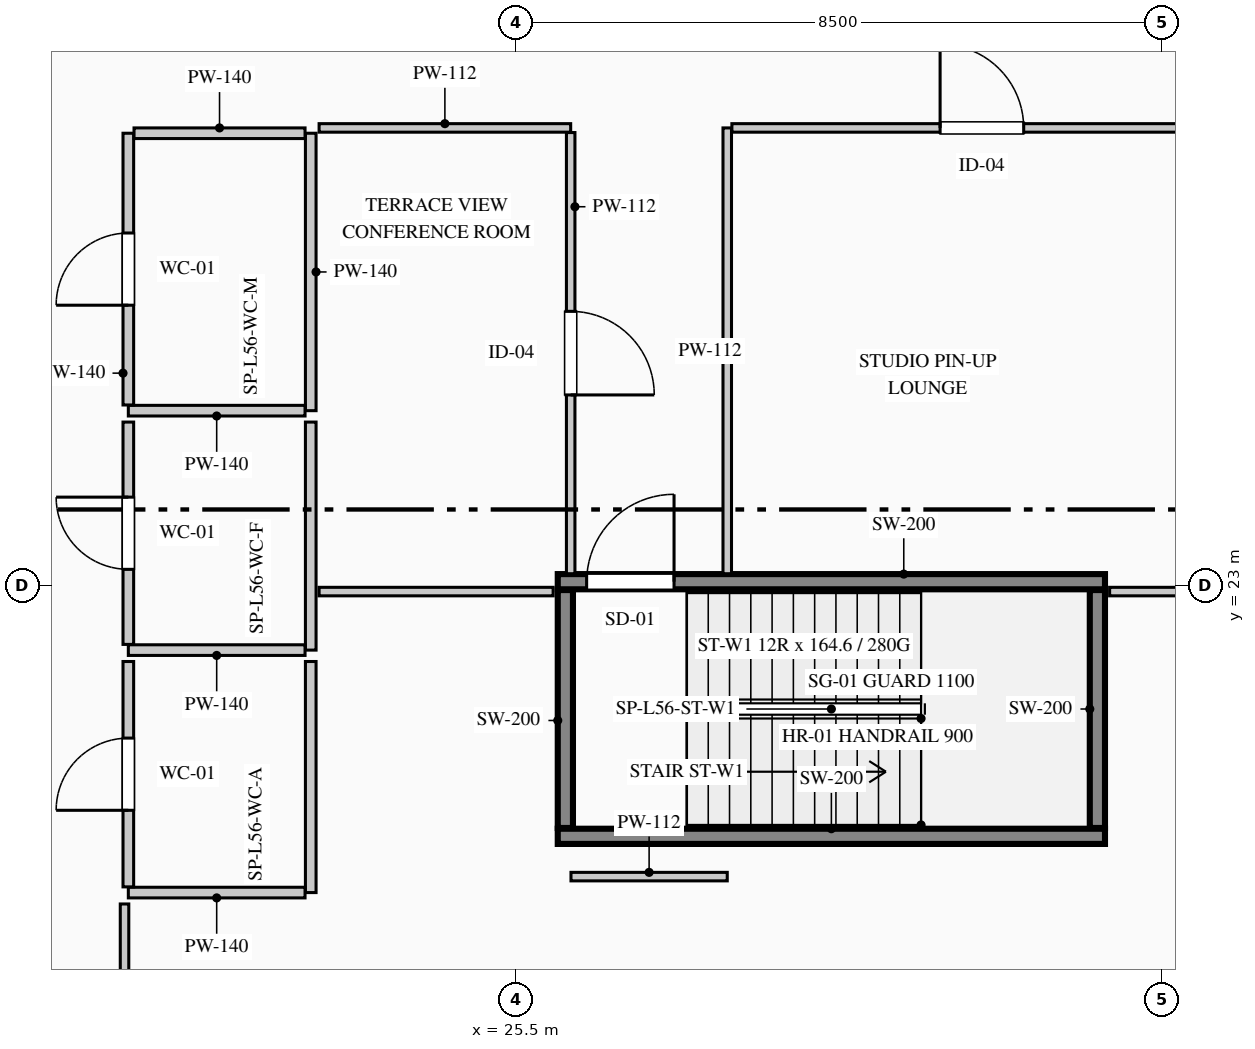
"""IFC4 building model, lengths in metres.
Left out: names, types, materials, properties, quantities, classifications, styles, units other than length and angle.
Written with IfcOpenShell. Run it as: python <this file> out.ifc"""

import sys

from ifc_helpers import new_model, si_unit, direction, frame, frame_2d, origin, place, context, subcontext, project, spatial, rectangle, extrude, element, fill, save


model = new_model("IFC4")
c1 = context("Model", 3, precision=1e-05, world=origin(), true_north=direction((0.0, 1.0)))
c2 = subcontext(c1, "Body", "Model", "MODEL_VIEW")
j1 = project(units=[si_unit("LENGTHUNIT", "METRE"), si_unit("PLANEANGLEUNIT", "RADIAN")], contexts=[c1])
p1 = place(None, origin())
s1 = spatial("IfcSite", under=j1, at=p1, CompositionType="ELEMENT")
p2 = place(p1, origin())
s2 = spatial("IfcBuilding", under=s1, at=p2, CompositionType="ELEMENT")
p3 = place(p2, frame((0.0, 0.0, 235.1)))
s3 = spatial("IfcBuildingStorey", under=s2, at=p3, CompositionType="ELEMENT", Elevation=235.1)
p4 = place(p3, frame((26.05, 19.7, 0.0), z_axis=(0.0, 0.0, 1.0), x_axis=(1.0, 0.0, 0.0)))
e1 = element("IfcWall", 1, at=p4, inside=s3, PredefinedType="SHEAR", context=c2, shape_type="SweptSolid", body=[
    extrude(rectangle(XDim=7.2, YDim=0.2, at=frame_2d((3.6, 0.0))), origin(), (0.0, 0.0, 1.0), 3.95),
])
p5 = place(p3, frame((26.05, 23.05, 0.0), z_axis=(0.0, 0.0, 1.0), x_axis=(1.0, 0.0, 0.0)))
e2 = element("IfcWall", 2, at=p5, inside=s3, PredefinedType="SHEAR", context=c2, shape_type="SweptSolid", body=[
    extrude(rectangle(XDim=7.2, YDim=0.2, at=frame_2d((3.6, 0.0))), origin(), (0.0, 0.0, 1.0), 3.95),
])
p6 = place(p5, frame((0.38, 0.0, 0.0)))
e3 = element("IfcOpeningElement", 3, at=p6, cuts=e2, PredefinedType="OPENING", context=c2, shape_type="SweptSolid", body=[
    extrude(rectangle(XDim=1.15, YDim=2.2, at=frame_2d((0.575, 1.1))), frame((0.0, 0.11, 0.0), z_axis=(0.0, -1.0, 0.0), x_axis=(1.0, 0.0, 0.0)), (0.0, 0.0, 1.0), 0.22),
])
for number, where, z_axis, x_axis in (
    (4, (26.15, 19.81, 0.0), (0.0, 0.0, 1.0), (0.0, 1.0, 0.0)),
    (5, (33.15, 19.81, 0.0), (0.0, 0.0, 1.0), (0.0, 1.0, 0.0)),
):
    element("IfcWall", number, at=place(p3, frame(where, z_axis=z_axis, x_axis=x_axis)), inside=s3, PredefinedType="SHEAR", context=c2, shape_type="SweptSolid", body=[
        extrude(rectangle(XDim=3.13, YDim=0.2, at=frame_2d((1.565, 0.0))), origin(), (0.0, 0.0, 1.0), 3.95),
    ])
p7 = place(p3, frame((22.8, 28.95, 0.0), z_axis=(0.0, 0.0, 1.0), x_axis=(0.0, -1.0, 0.0)))
e6 = element("IfcWall", 6, at=p7, inside=s3, PredefinedType="PARTITIONING", context=c2, shape_type="SweptSolid", body=[
    extrude(rectangle(XDim=3.65, YDim=0.14, at=frame_2d((1.825, 0.0))), origin(), (0.0, 0.0, 1.0), 3.325),
])
p8 = place(p3, frame((22.725, 25.3, 0.0), z_axis=(0.0, 0.0, 1.0), x_axis=(-1.0, 0.0, 0.0)))
e7 = element("IfcWall", 7, at=p8, inside=s3, PredefinedType="PARTITIONING", context=c2, shape_type="SweptSolid", body=[
    extrude(rectangle(XDim=2.325, YDim=0.14, at=frame_2d((1.163, 0.0))), origin(), (0.0, 0.0, 1.0), 3.7),
])
p9 = place(p3, frame((20.4, 25.375, 0.0), z_axis=(0.0, 0.0, 1.0), x_axis=(0.0, 1.0, 0.0)))
e8 = element("IfcWall", 8, at=p9, inside=s3, PredefinedType="PARTITIONING", context=c2, shape_type="SweptSolid", body=[
    extrude(rectangle(XDim=3.575, YDim=0.14, at=frame_2d((1.788, 0.0))), origin(), (0.0, 0.0, 1.0), 3.7),
])
p10 = place(p9, frame((1.312, 0.0, 0.0)))
e9 = element("IfcOpeningElement", 9, at=p10, cuts=e8, PredefinedType="OPENING", context=c2, shape_type="SweptSolid", body=[
    extrude(rectangle(XDim=0.95, YDim=2.15, at=frame_2d((0.475, 1.075))), frame((0.0, 0.08, 0.0), z_axis=(0.0, -1.0, 0.0), x_axis=(1.0, 0.0, 0.0)), (0.0, 0.0, 1.0), 0.16),
])
p11 = place(p3, frame((20.475, 28.95, 0.0), z_axis=(0.0, 0.0, 1.0), x_axis=(1.0, 0.0, 0.0)))
e10 = element("IfcWall", 10, at=p11, inside=s3, PredefinedType="PARTITIONING", context=c2, shape_type="SweptSolid", body=[
    extrude(rectangle(XDim=2.25, YDim=0.14, at=frame_2d((1.125, 0.0))), origin(), (0.0, 0.0, 1.0), 3.7),
])
p12 = place(p3, frame((22.8, 25.15, 0.0), z_axis=(0.0, 0.0, 1.0), x_axis=(0.0, -1.0, 0.0)))
e11 = element("IfcWall", 11, at=p12, inside=s3, PredefinedType="PARTITIONING", context=c2, shape_type="SweptSolid", body=[
    extrude(rectangle(XDim=3.0, YDim=0.14, at=frame_2d((1.5, 0.0))), origin(), (0.0, 0.0, 1.0), 3.325),
])
p13 = place(p3, frame((22.725, 22.15, 0.0), z_axis=(0.0, 0.0, 1.0), x_axis=(-1.0, 0.0, 0.0)))
e12 = element("IfcWall", 12, at=p13, inside=s3, PredefinedType="PARTITIONING", context=c2, shape_type="SweptSolid", body=[
    extrude(rectangle(XDim=2.325, YDim=0.14, at=frame_2d((1.163, 0.0))), origin(), (0.0, 0.0, 1.0), 3.7),
])
p14 = place(p3, frame((20.4, 22.225, 0.0), z_axis=(0.0, 0.0, 1.0), x_axis=(0.0, 1.0, 0.0)))
e13 = element("IfcWall", 13, at=p14, inside=s3, PredefinedType="PARTITIONING", context=c2, shape_type="SweptSolid", body=[
    extrude(rectangle(XDim=2.925, YDim=0.14, at=frame_2d((1.462, 0.0))), origin(), (0.0, 0.0, 1.0), 3.7),
])
p15 = place(p14, frame((0.988, 0.0, 0.0)))
e14 = element("IfcOpeningElement", 14, at=p15, cuts=e13, PredefinedType="OPENING", context=c2, shape_type="SweptSolid", body=[
    extrude(rectangle(XDim=0.95, YDim=2.15, at=frame_2d((0.475, 1.075))), frame((0.0, 0.08, 0.0), z_axis=(0.0, -1.0, 0.0), x_axis=(1.0, 0.0, 0.0)), (0.0, 0.0, 1.0), 0.16),
])
p16 = place(p3, frame((22.8, 22.0, 0.0), z_axis=(0.0, 0.0, 1.0), x_axis=(0.0, -1.0, 0.0)))
e15 = element("IfcWall", 15, at=p16, inside=s3, PredefinedType="PARTITIONING", context=c2, shape_type="SweptSolid", body=[
    extrude(rectangle(XDim=3.04, YDim=0.14, at=frame_2d((1.52, 0.0))), origin(), (0.0, 0.0, 1.0), 3.325),
])
p17 = place(p3, frame((22.725, 18.96, 0.0), z_axis=(0.0, 0.0, 1.0), x_axis=(-1.0, 0.0, 0.0)))
e16 = element("IfcWall", 16, at=p17, inside=s3, PredefinedType="PARTITIONING", context=c2, shape_type="SweptSolid", body=[
    extrude(rectangle(XDim=2.325, YDim=0.14, at=frame_2d((1.163, 0.0))), origin(), (0.0, 0.0, 1.0), 3.7),
])
p18 = place(p3, frame((20.4, 19.035, 0.0), z_axis=(0.0, 0.0, 1.0), x_axis=(0.0, 1.0, 0.0)))
e17 = element("IfcWall", 17, at=p18, inside=s3, PredefinedType="PARTITIONING", context=c2, shape_type="SweptSolid", body=[
    extrude(rectangle(XDim=2.965, YDim=0.14, at=frame_2d((1.482, 0.0))), origin(), (0.0, 0.0, 1.0), 3.7),
])
p19 = place(p18, frame((1.008, 0.0, 0.0)))
e18 = element("IfcOpeningElement", 18, at=p19, cuts=e17, PredefinedType="OPENING", context=c2, shape_type="SweptSolid", body=[
    extrude(rectangle(XDim=0.95, YDim=2.15, at=frame_2d((0.475, 1.075))), frame((0.0, 0.08, 0.0), z_axis=(0.0, -1.0, 0.0), x_axis=(1.0, 0.0, 0.0)), (0.0, 0.0, 1.0), 0.16),
])
p20 = place(p3, frame((33.311, 22.92, 0.0), z_axis=(0.0, 0.0, 1.0), x_axis=(1.0, 0.0, 0.0)))
e19 = element("IfcWall", 19, at=p20, inside=s3, PredefinedType="PARTITIONING", context=c2, shape_type="SweptSolid", body=[
    extrude(rectangle(XDim=5.817, YDim=0.112, at=frame_2d((2.909, 0.0))), origin(), (0.0, 0.0, 1.0), 3.7),
])
p21 = place(p3, frame((20.35, 12.689, 0.0), z_axis=(0.0, 0.0, 1.0), x_axis=(0.0, 1.0, 0.0)))
e20 = element("IfcWall", 20, at=p21, inside=s3, PredefinedType="PARTITIONING", context=c2, shape_type="SweptSolid", body=[
    extrude(rectangle(XDim=6.121, YDim=0.112, at=frame_2d((3.061, 0.0))), origin(), (0.0, 0.0, 1.0), 3.7),
])
p22 = place(p21, frame((2.511, 0.0, 0.0)))
e21 = element("IfcOpeningElement", 21, at=p22, cuts=e20, PredefinedType="OPENING", context=c2, shape_type="SweptSolid", body=[
    extrude(rectangle(XDim=1.1, YDim=2.2, at=frame_2d((0.55, 1.1))), frame((0.0, 0.066, 0.0), z_axis=(0.0, -1.0, 0.0), x_axis=(1.0, 0.0, 0.0)), (0.0, 0.0, 1.0), 0.132),
])
p23 = place(p3, frame((22.91, 22.92, 0.0), z_axis=(0.0, 0.0, 1.0), x_axis=(1.0, 0.0, 0.0)))
e22 = element("IfcWall", 22, at=p23, inside=s3, PredefinedType="PARTITIONING", context=c2, shape_type="SweptSolid", body=[
    extrude(rectangle(XDim=3.079, YDim=0.112, at=frame_2d((1.54, 0.0))), origin(), (0.0, 0.0, 1.0), 3.7),
])
p24 = place(p3, frame((26.224, 19.17, 0.0), z_axis=(0.0, 0.0, 1.0), x_axis=(1.0, 0.0, 0.0)))
e23 = element("IfcWall", 23, at=p24, inside=s3, PredefinedType="PARTITIONING", context=c2, shape_type="SweptSolid", body=[
    extrude(rectangle(XDim=2.056, YDim=0.112, at=frame_2d((1.028, 0.0))), origin(), (0.0, 0.0, 1.0), 3.7),
])
p25 = place(p3, frame((22.91, 29.02, 0.0), z_axis=(0.0, 0.0, 1.0), x_axis=(1.0, 0.0, 0.0)))
e24 = element("IfcWall", 24, at=p25, inside=s3, PredefinedType="PARTITIONING", context=c2, shape_type="SweptSolid", body=[
    extrude(rectangle(XDim=3.31, YDim=0.112, at=frame_2d((1.655, 0.0))), origin(), (0.0, 0.0, 1.0), 3.485),
])
p26 = place(p3, frame((26.22, 28.959, 0.0), z_axis=(0.0, 0.0, 1.0), x_axis=(0.0, -1.0, 0.0)))
e25 = element("IfcWall", 25, at=p26, inside=s3, PredefinedType="PARTITIONING", context=c2, shape_type="SweptSolid", body=[
    extrude(rectangle(XDim=5.804, YDim=0.112, at=frame_2d((2.902, 0.0))), origin(), (0.0, 0.0, 1.0), 3.7),
])
p27 = place(p26, frame((2.352, 0.0, 0.0)))
e26 = element("IfcOpeningElement", 26, at=p27, cuts=e25, PredefinedType="OPENING", context=c2, shape_type="SweptSolid", body=[
    extrude(rectangle(XDim=1.1, YDim=2.2, at=frame_2d((0.55, 1.1))), frame((0.0, 0.066, 0.0), z_axis=(0.0, -1.0, 0.0), x_axis=(1.0, 0.0, 0.0)), (0.0, 0.0, 1.0), 0.132),
])
p28 = place(p3, frame((28.28, 23.155, 0.0), z_axis=(0.0, 0.0, 1.0), x_axis=(0.0, 1.0, 0.0)))
e27 = element("IfcWall", 27, at=p28, inside=s3, PredefinedType="PARTITIONING", context=c2, shape_type="SweptSolid", body=[
    extrude(rectangle(XDim=5.865, YDim=0.112, at=frame_2d((2.933, 0.0))), origin(), (0.0, 0.0, 1.0), 3.7),
])
p29 = place(p3, frame((28.341, 29.02, 0.0), z_axis=(0.0, 0.0, 1.0), x_axis=(1.0, 0.0, 0.0)))
e28 = element("IfcWall", 28, at=p29, inside=s3, PredefinedType="PARTITIONING", context=c2, shape_type="SweptSolid", body=[
    extrude(rectangle(XDim=6.579, YDim=0.112, at=frame_2d((3.29, 0.0))), origin(), (0.0, 0.0, 1.0), 3.485),
])
p30 = place(p29, frame((2.74, 0.0, 0.0)))
e29 = element("IfcOpeningElement", 29, at=p30, cuts=e28, PredefinedType="OPENING", context=c2, shape_type="SweptSolid", body=[
    extrude(rectangle(XDim=1.1, YDim=2.2, at=frame_2d((0.55, 1.1))), frame((0.0, 0.066, 0.0), z_axis=(0.0, -1.0, 0.0), x_axis=(1.0, 0.0, 0.0)), (0.0, 0.0, 1.0), 0.132),
])
p31 = place(p6, origin())
e30 = element("IfcDoor", 30, at=p31, inside=s3, OperationType="SINGLE_SWING_RIGHT", PredefinedType="DOOR", context=c2, shape_type="SweptSolid", body=[
    extrude(rectangle(XDim=1.15, YDim=2.2, at=frame_2d((0.575, 1.1))), frame((0.0, 0.025, 0.0), z_axis=(0.0, -1.0, 0.0), x_axis=(1.0, 0.0, 0.0)), (0.0, 0.0, 1.0), 0.05),
])
fill(e3, e30)
p32 = place(p10, origin())
e31 = element("IfcDoor", 31, at=p32, inside=s3, OperationType="SINGLE_SWING_LEFT", PredefinedType="DOOR", context=c2, shape_type="SweptSolid", body=[
    extrude(rectangle(XDim=0.95, YDim=2.15, at=frame_2d((0.475, 1.075))), frame((0.0, 0.025, 0.0), z_axis=(0.0, -1.0, 0.0), x_axis=(1.0, 0.0, 0.0)), (0.0, 0.0, 1.0), 0.05),
])
fill(e9, e31)
p33 = place(p15, origin())
e32 = element("IfcDoor", 32, at=p33, inside=s3, OperationType="SINGLE_SWING_RIGHT", PredefinedType="DOOR", context=c2, shape_type="SweptSolid", body=[
    extrude(rectangle(XDim=0.95, YDim=2.15, at=frame_2d((0.475, 1.075))), frame((0.0, 0.025, 0.0), z_axis=(0.0, -1.0, 0.0), x_axis=(1.0, 0.0, 0.0)), (0.0, 0.0, 1.0), 0.05),
])
fill(e14, e32)
p34 = place(p19, origin())
e33 = element("IfcDoor", 33, at=p34, inside=s3, OperationType="SINGLE_SWING_LEFT", PredefinedType="DOOR", context=c2, shape_type="SweptSolid", body=[
    extrude(rectangle(XDim=0.95, YDim=2.15, at=frame_2d((0.475, 1.075))), frame((0.0, 0.025, 0.0), z_axis=(0.0, -1.0, 0.0), x_axis=(1.0, 0.0, 0.0)), (0.0, 0.0, 1.0), 0.05),
])
fill(e18, e33)
p35 = place(p27, origin())
e34 = element("IfcDoor", 34, at=p35, inside=s3, OperationType="SINGLE_SWING_RIGHT", PredefinedType="DOOR", context=c2, shape_type="SweptSolid", body=[
    extrude(rectangle(XDim=1.1, YDim=2.2, at=frame_2d((0.55, 1.1))), frame((0.0, 0.025, 0.0), z_axis=(0.0, -1.0, 0.0), x_axis=(1.0, 0.0, 0.0)), (0.0, 0.0, 1.0), 0.05),
])
fill(e26, e34)
p36 = place(p30, origin())
e35 = element("IfcDoor", 35, at=p36, inside=s3, OperationType="SINGLE_SWING_LEFT", PredefinedType="DOOR", context=c2, shape_type="SweptSolid", body=[
    extrude(rectangle(XDim=1.1, YDim=2.2, at=frame_2d((0.55, 1.1))), frame((0.0, 0.025, 0.0), z_axis=(0.0, -1.0, 0.0), x_axis=(1.0, 0.0, 0.0)), (0.0, 0.0, 1.0), 0.05),
])
fill(e29, e35)
save(model, sys.argv[1])
